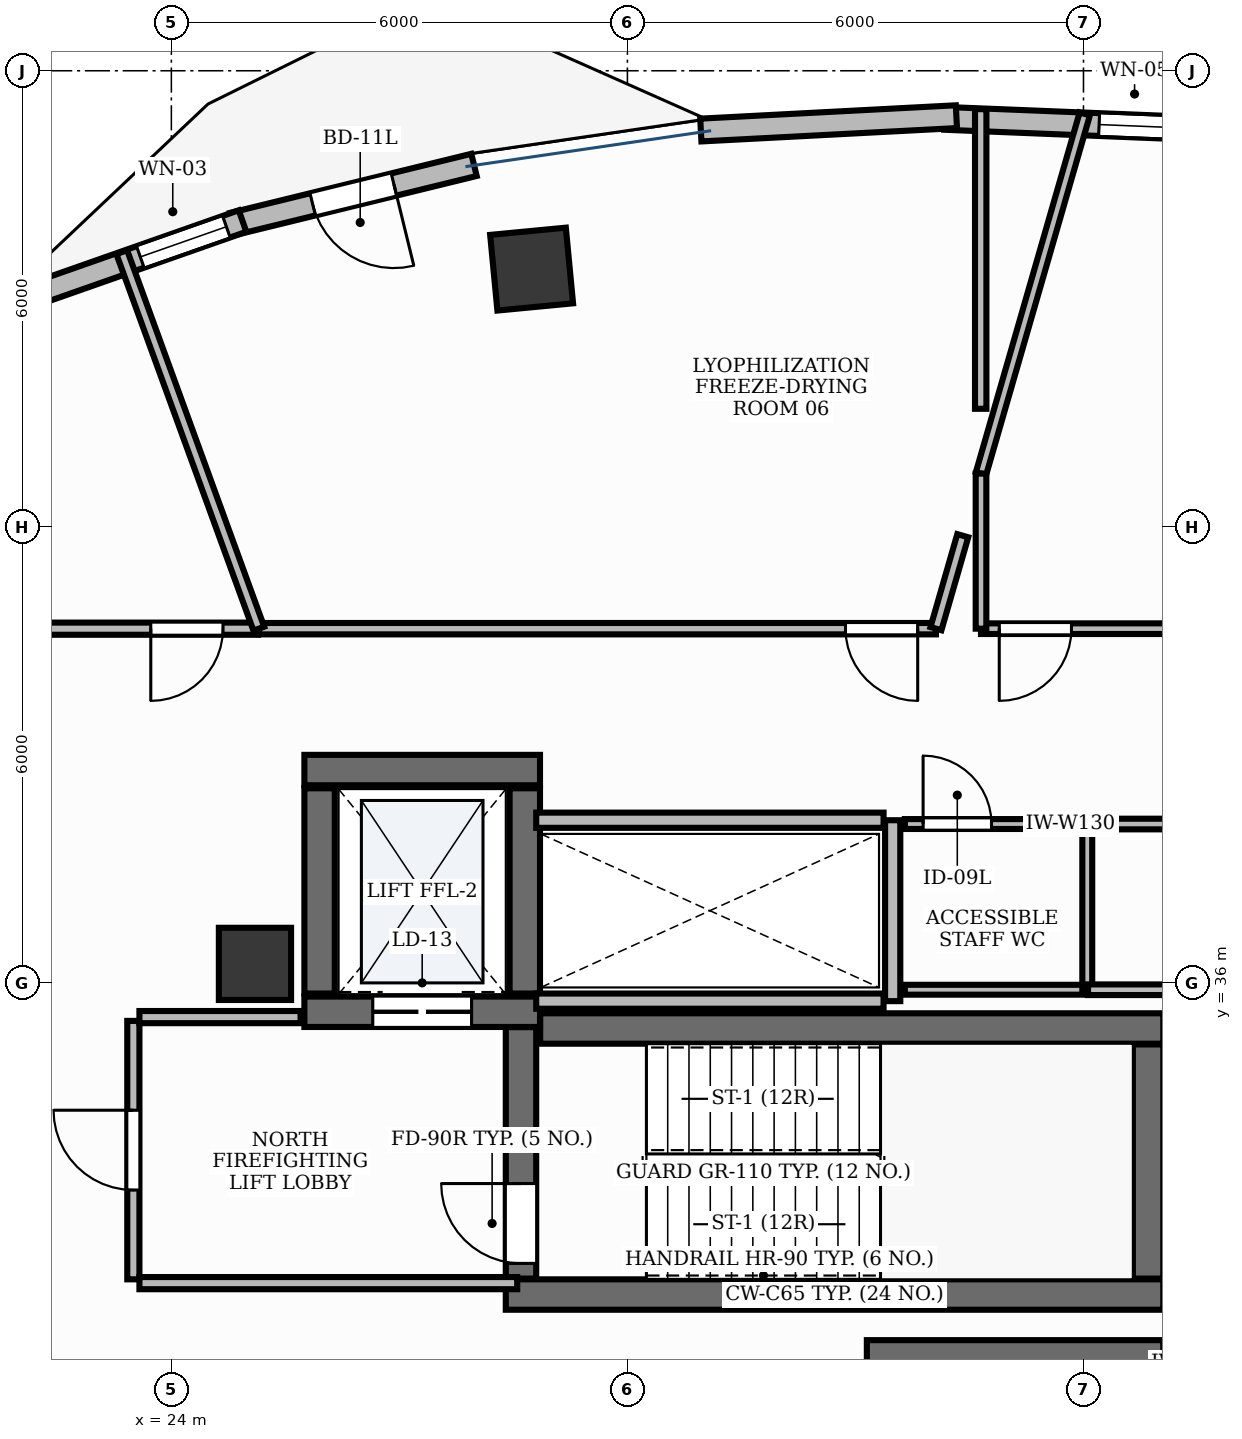
"""IFC4 building model, lengths in metres.
Left out: names, types, materials, properties, quantities, classifications, styles, units other than length and angle.
Written with IfcOpenShell. Run it as: python <this file> out.ifc"""

import sys

from ifc_helpers import new_model, si_unit, direction, frame, frame_2d, origin, origin_2d, place, context, subcontext, project, spatial, rectangle, extrude, element, fill, save


model = new_model("IFC4")
c1 = context("Model", 3, precision=1e-05, world=origin(), true_north=direction((0.0, 1.0)))
c2 = subcontext(c1, "Body", "Model", "MODEL_VIEW")
j1 = project(units=[si_unit("LENGTHUNIT", "METRE"), si_unit("PLANEANGLEUNIT", "RADIAN")], contexts=[c1])
p1 = place(None, origin())
s1 = spatial("IfcSite", under=j1, at=p1, CompositionType="ELEMENT")
p2 = place(p1, origin())
s2 = spatial("IfcBuilding", under=s1, at=p2, CompositionType="ELEMENT")
p3 = place(p2, frame((0.0, 0.0, 171.0)))
s3 = spatial("IfcBuildingStorey", under=s2, at=p3, CompositionType="ELEMENT", Elevation=171.0)
p4 = place(p3, frame((28.852, 35.4, 0.0), z_axis=(0.0, 0.0, 1.0), x_axis=(1.0, 0.0, 0.0)))
e1 = element("IfcWall", 1, at=p4, inside=s3, PredefinedType="SHEAR", context=c2, shape_type="SweptSolid", body=[
    extrude(rectangle(XDim=8.198, YDim=0.4, at=frame_2d((4.099, 0.0))), origin(), (0.0, 0.0, 1.0), 3.9),
])
p5 = place(p3, frame((28.4, 31.9, 0.0), z_axis=(0.0, 0.0, 1.0), x_axis=(1.0, 0.0, 0.0)))
e2 = element("IfcWall", 2, at=p5, inside=s3, PredefinedType="SHEAR", context=c2, shape_type="SweptSolid", body=[
    extrude(rectangle(XDim=8.65, YDim=0.4, at=frame_2d((4.325, 0.0))), origin(), (0.0, 0.0, 1.0), 3.9),
])
p6 = place(p3, frame((36.85, 32.11, 0.0), z_axis=(0.0, 0.0, 1.0), x_axis=(0.0, 1.0, 0.0)))
e3 = element("IfcWall", 3, at=p6, inside=s3, PredefinedType="SHEAR", context=c2, shape_type="SweptSolid", body=[
    extrude(rectangle(XDim=3.08, YDim=0.4, at=frame_2d((1.54, 0.0))), origin(), (0.0, 0.0, 1.0), 3.9),
])
p7 = place(p3, frame((28.6, 32.11, 0.0), z_axis=(0.0, 0.0, 1.0), x_axis=(0.0, 1.0, 0.0)))
e4 = element("IfcWall", 4, at=p7, inside=s3, PredefinedType="SHEAR", context=c2, shape_type="SweptSolid", body=[
    extrude(rectangle(XDim=3.308, YDim=0.4, at=frame_2d((1.654, 0.0))), origin(), (0.0, 0.0, 1.0), 3.9),
])
p8 = place(p7, frame((0.2, 0.0, 0.0)))
e5 = element("IfcOpeningElement", 5, at=p8, cuts=e4, PredefinedType="OPENING", context=c2, shape_type="SweptSolid", body=[
    extrude(rectangle(XDim=1.05, YDim=2.15, at=frame_2d((0.525, 1.075))), frame((0.0, 0.215, 0.0), z_axis=(0.0, -1.0, 0.0), x_axis=(1.0, 0.0, 0.0)), (0.0, 0.0, 1.0), 0.43),
])
p9 = place(p3, frame((33.15, 31.1, 0.0), z_axis=(0.0, 0.0, 1.0), x_axis=(1.0, 0.0, 0.0)))
e6 = element("IfcWall", 6, at=p9, inside=s3, PredefinedType="SHEAR", context=c2, shape_type="SweptSolid", body=[
    extrude(rectangle(XDim=3.9, YDim=0.4, at=frame_2d((1.95, 0.0))), origin(), (0.0, 0.0, 1.0), 3.9),
])
p10 = place(p3, frame((25.75, 38.8, 0.0), z_axis=(0.0, 0.0, 1.0), x_axis=(1.0, 0.0, 0.0)))
e7 = element("IfcWall", 7, at=p10, inside=s3, PredefinedType="SHEAR", context=c2, shape_type="SweptSolid", body=[
    extrude(rectangle(XDim=3.1, YDim=0.4, at=frame_2d((1.55, 0.0))), origin(), (0.0, 0.0, 1.0), 3.9),
])
p11 = place(p3, frame((25.75, 35.62, 0.0), z_axis=(0.0, 0.0, 1.0), x_axis=(1.0, 0.0, 0.0)))
e8 = element("IfcWall", 8, at=p11, inside=s3, PredefinedType="SHEAR", context=c2, shape_type="SweptSolid", body=[
    extrude(rectangle(XDim=3.1, YDim=0.4, at=frame_2d((1.55, 0.0))), origin(), (0.0, 0.0, 1.0), 3.9),
])
p12 = place(p11, frame((0.9, 0.0, 0.0)))
e9 = element("IfcOpeningElement", 9, at=p12, cuts=e8, PredefinedType="OPENING", context=c2, shape_type="SweptSolid", body=[
    extrude(rectangle(XDim=1.3, YDim=2.2, at=frame_2d((0.65, 1.1))), frame((0.0, 0.215, 0.0), z_axis=(0.0, -1.0, 0.0), x_axis=(1.0, 0.0, 0.0)), (0.0, 0.0, 1.0), 0.43),
])
for number, where, z_axis, x_axis in (
    (10, (25.95, 35.86, 0.0), (0.0, 0.0, 1.0), (0.0, 1.0, 0.0)),
    (11, (28.65, 35.86, 0.0), (0.0, 0.0, 1.0), (0.0, 1.0, 0.0)),
):
    element("IfcWall", number, at=place(p3, frame(where, z_axis=z_axis, x_axis=x_axis)), inside=s3, PredefinedType="SHEAR", context=c2, shape_type="SweptSolid", body=[
        extrude(rectangle(XDim=2.7, YDim=0.4, at=frame_2d((1.35, 0.0))), origin(), (0.0, 0.0, 1.0), 3.9),
    ])
p13 = place(p3, frame((25.1, 36.25, -0.0), z_axis=(0.0, 0.0, 1.0), x_axis=(1.0, 0.0, 0.0)))
e12 = element("IfcColumn", 12, at=p13, inside=s3, PredefinedType="PILASTER", context=c2, shape_type="SweptSolid", body=[
    extrude(rectangle(XDim=0.95, YDim=0.95, at=origin_2d()), origin(), (0.0, 0.0, 1.0), 3.901),
])
p14 = place(p3, frame((28.74, 45.39, -0.0), z_axis=(0.0, 0.0, 1.0), x_axis=(0.995462868748, 0.095150811579, 0.0)))
e13 = element("IfcColumn", 13, at=p14, inside=s3, PredefinedType="COLUMN", context=c2, shape_type="SweptSolid", body=[
    extrude(rectangle(XDim=1.0, YDim=1.0, at=origin_2d()), origin(), (0.0, 0.0, 1.0), 3.901),
])
p15 = place(p3, frame((37.5, 47.24, 0.0), z_axis=(0.0, 0.0, 1.0), x_axis=(-0.999191674443, 0.040199474165, 0.0)))
e14 = element("IfcWall", 14, at=p15, inside=s3, PredefinedType="STANDARD", context=c2, shape_type="SweptSolid", body=[
    extrude(rectangle(XDim=3.328, YDim=0.3, at=frame_2d((1.664, 0.0))), origin(), (0.0, 0.0, 1.0), 3.9),
])
p16 = place(p15, frame((0.395, 0.0, 0.95)))
e15 = element("IfcOpeningElement", 15, at=p16, cuts=e14, PredefinedType="OPENING", context=c2, shape_type="SweptSolid", body=[
    extrude(rectangle(XDim=0.9, YDim=1.8, at=frame_2d((0.45, 0.9))), frame((0.0, 0.165, 0.0), z_axis=(0.0, -1.0, 0.0), x_axis=(1.0, 0.0, 0.0)), (0.0, 0.0, 1.0), 0.33),
])
p17 = place(p3, frame((27.982, 46.762, 0.0), z_axis=(0.0, 0.0, 1.0), x_axis=(-0.971312804689, -0.237805457142, 0.0)))
e16 = element("IfcWall", 16, at=p17, inside=s3, PredefinedType="STANDARD", context=c2, shape_type="SweptSolid", body=[
    extrude(rectangle(XDim=3.269, YDim=0.3, at=frame_2d((1.634, 0.0))), origin(), (0.0, 0.0, 1.0), 3.9),
])
p18 = place(p17, frame((1.084, 0.0, 0.0)))
e17 = element("IfcOpeningElement", 17, at=p18, cuts=e16, PredefinedType="OPENING", context=c2, shape_type="SweptSolid", body=[
    extrude(rectangle(XDim=1.1, YDim=2.15, at=frame_2d((0.55, 1.075))), frame((0.0, 0.165, 0.0), z_axis=(0.0, -1.0, 0.0), x_axis=(1.0, 0.0, 0.0)), (0.0, 0.0, 1.0), 0.33),
])
p19 = place(p3, frame((24.937, 46.023, 0.0), z_axis=(0.0, 0.0, 1.0), x_axis=(-0.943495444321, -0.331385495377, 0.0)))
e18 = element("IfcWall", 18, at=p19, inside=s3, PredefinedType="STANDARD", context=c2, shape_type="SweptSolid", body=[
    extrude(rectangle(XDim=3.214, YDim=0.3, at=frame_2d((1.607, 0.0))), origin(), (0.0, 0.0, 1.0), 3.9),
])
p20 = place(p19, frame((0.226, 0.0, 0.9)))
e19 = element("IfcOpeningElement", 19, at=p20, cuts=e18, PredefinedType="OPENING", context=c2, shape_type="SweptSolid", body=[
    extrude(rectangle(XDim=1.2, YDim=2.7, at=frame_2d((0.6, 1.35))), frame((0.0, 0.165, 0.0), z_axis=(0.0, -1.0, 0.0), x_axis=(1.0, 0.0, 0.0)), (0.0, 0.0, 1.0), 0.33),
])
p21 = place(p3, frame((34.328, 47.396, 0.0), z_axis=(0.0, 0.0, 1.0), x_axis=(-0.998639777298, -0.052140149581, 0.0)))
e20 = element("IfcWall", 20, at=p21, inside=s3, PredefinedType="STANDARD", context=c2, shape_type="SweptSolid", body=[
    extrude(rectangle(XDim=3.367, YDim=0.3, at=frame_2d((1.683, 0.0))), origin(), (0.0, 0.0, 1.0), 3.9),
])
p22 = place(p3, frame((33.49, 35.76, 0.0), z_axis=(0.0, 0.0, 1.0), x_axis=(0.0, 1.0, 0.0)))
e21 = element("IfcWall", 21, at=p22, inside=s3, PredefinedType="PARTITIONING", context=c2, shape_type="SweptSolid", body=[
    extrude(rectangle(XDim=2.38, YDim=0.2, at=frame_2d((1.19, 0.0))), origin(), (0.0, 0.0, 1.0), 2.91),
])
for number, where, z_axis, x_axis in (
    (22, (28.8, 35.76, 0.0), (0.0, 0.0, 1.0), (1.0, 0.0, 0.0)),
    (23, (28.8, 38.14, 0.0), (0.0, 0.0, 1.0), (1.0, 0.0, 0.0)),
):
    element("IfcWall", number, at=place(p3, frame(where, z_axis=z_axis, x_axis=x_axis)), inside=s3, PredefinedType="PARTITIONING", context=c2, shape_type="SweptSolid", body=[
        extrude(rectangle(XDim=4.57, YDim=0.2, at=frame_2d((2.285, 0.0))), origin(), (0.0, 0.0, 1.0), 2.91),
    ])
p23 = place(p3, frame((23.5, 32.1, 0.0), z_axis=(0.0, 0.0, 1.0), x_axis=(0.0, 1.0, 0.0)))
e24 = element("IfcWall", 24, at=p23, inside=s3, PredefinedType="PARTITIONING", context=c2, shape_type="SweptSolid", body=[
    extrude(rectangle(XDim=3.4, YDim=0.16, at=frame_2d((1.7, 0.0))), origin(), (0.0, 0.0, 1.0), 2.91),
])
p24 = place(p23, frame((1.175, 0.0, 0.0)))
e25 = element("IfcOpeningElement", 25, at=p24, cuts=e24, PredefinedType="OPENING", context=c2, shape_type="SweptSolid", body=[
    extrude(rectangle(XDim=1.05, YDim=2.15, at=frame_2d((0.525, 1.075))), frame((0.0, 0.095, 0.0), z_axis=(0.0, -1.0, 0.0), x_axis=(1.0, 0.0, 0.0)), (0.0, 0.0, 1.0), 0.19),
])
p25 = place(p3, frame((23.58, 32.05, 0.0), z_axis=(0.0, 0.0, 1.0), x_axis=(1.0, 0.0, 0.0)))
e26 = element("IfcWall", 26, at=p25, inside=s3, PredefinedType="PARTITIONING", context=c2, shape_type="SweptSolid", body=[
    extrude(rectangle(XDim=4.97, YDim=0.16, at=frame_2d((2.485, 0.0))), origin(), (0.0, 0.0, 1.0), 2.91),
])
p26 = place(p3, frame((23.58, 35.55, 0.0), z_axis=(0.0, 0.0, 1.0), x_axis=(1.0, 0.0, 0.0)))
e27 = element("IfcWall", 27, at=p26, inside=s3, PredefinedType="PARTITIONING", context=c2, shape_type="SweptSolid", body=[
    extrude(rectangle(XDim=2.12, YDim=0.16, at=frame_2d((1.06, 0.0))), origin(), (0.0, 0.0, 1.0), 2.91),
])
p27 = place(p3, frame((33.65, 38.09, 0.0), z_axis=(0.0, 0.0, 1.0), x_axis=(1.0, 0.0, 0.0)))
e28 = element("IfcWall", 28, at=p27, inside=s3, PredefinedType="PARTITIONING", context=c2, shape_type="SweptSolid", body=[
    extrude(rectangle(XDim=2.4, YDim=0.13, at=frame_2d((1.2, 0.0))), origin(), (0.0, 0.0, 1.0), 2.91),
])
p28 = place(p27, frame((0.24, 0.0, 0.0)))
e29 = element("IfcOpeningElement", 29, at=p28, cuts=e28, PredefinedType="OPENING", context=c2, shape_type="SweptSolid", body=[
    extrude(rectangle(XDim=0.9, YDim=2.15, at=frame_2d((0.45, 1.075))), frame((0.0, 0.08, 0.0), z_axis=(0.0, -1.0, 0.0), x_axis=(1.0, 0.0, 0.0)), (0.0, 0.0, 1.0), 0.16),
])
p29 = place(p3, frame((37.2, 40.66, 0.0), z_axis=(0.0, 0.0, 1.0), x_axis=(-1.0, 0.0, 0.0)))
e30 = element("IfcWall", 30, at=p29, inside=s3, PredefinedType="PARTITIONING", context=c2, shape_type="SweptSolid", body=[
    extrude(rectangle(XDim=2.548, YDim=0.14, at=frame_2d((1.274, 0.0))), origin(), (0.0, 0.0, 1.0), 2.91),
])
p30 = place(p29, frame((1.358, 0.0, 0.0)))
e31 = element("IfcOpeningElement", 31, at=p30, cuts=e30, PredefinedType="OPENING", context=c2, shape_type="SweptSolid", body=[
    extrude(rectangle(XDim=0.95, YDim=2.15, at=frame_2d((0.475, 1.075))), frame((0.0, 0.085, 0.0), z_axis=(0.0, -1.0, 0.0), x_axis=(1.0, 0.0, 0.0)), (0.0, 0.0, 1.0), 0.17),
])
p31 = place(p3, frame((34.059, 40.66, 0.0), z_axis=(0.0, 0.0, 1.0), x_axis=(-1.0, 0.0, 0.0)))
e32 = element("IfcWall", 32, at=p31, inside=s3, PredefinedType="PARTITIONING", context=c2, shape_type="SweptSolid", body=[
    extrude(rectangle(XDim=8.908, YDim=0.15, at=frame_2d((4.454, 0.0))), origin(), (0.0, 0.0, 1.0), 2.91),
])
p32 = place(p31, frame((0.24, 0.0, 0.0)))
e33 = element("IfcOpeningElement", 33, at=p32, cuts=e32, PredefinedType="OPENING", context=c2, shape_type="SweptSolid", body=[
    extrude(rectangle(XDim=0.95, YDim=2.15, at=frame_2d((0.475, 1.075))), frame((0.0, 0.09, 0.0), z_axis=(0.0, -1.0, 0.0), x_axis=(1.0, 0.0, 0.0)), (0.0, 0.0, 1.0), 0.18),
])
p33 = place(p3, frame((25.14, 40.66, 0.0), z_axis=(0.0, 0.0, 1.0), x_axis=(-1.0, 0.0, 0.0)))
e34 = element("IfcWall", 34, at=p33, inside=s3, PredefinedType="PARTITIONING", context=c2, shape_type="SweptSolid", body=[
    extrude(rectangle(XDim=3.39, YDim=0.16, at=frame_2d((1.695, 0.0))), origin(), (0.0, 0.0, 1.0), 2.91),
])
p34 = place(p33, frame((0.461, 0.0, 0.0)))
e35 = element("IfcOpeningElement", 35, at=p34, cuts=e34, PredefinedType="OPENING", context=c2, shape_type="SweptSolid", body=[
    extrude(rectangle(XDim=0.95, YDim=2.15, at=frame_2d((0.475, 1.075))), frame((0.0, 0.095, 0.0), z_axis=(0.0, -1.0, 0.0), x_axis=(1.0, 0.0, 0.0)), (0.0, 0.0, 1.0), 0.19),
])
p35 = place(p3, frame((36.05, 35.91, 0.0), z_axis=(0.0, 0.0, 1.0), x_axis=(-1.0, 0.0, 0.0)))
e36 = element("IfcWall", 36, at=p35, inside=s3, PredefinedType="PARTITIONING", context=c2, shape_type="SweptSolid", body=[
    extrude(rectangle(XDim=2.4, YDim=0.13, at=frame_2d((1.2, 0.0))), origin(), (0.0, 0.0, 1.0), 2.91),
])
p36 = place(p3, frame((36.05, 38.09, 0.0), z_axis=(0.0, 0.0, 1.0), x_axis=(0.0, -1.0, 0.0)))
e37 = element("IfcWall", 37, at=p36, inside=s3, PredefinedType="PARTITIONING", context=c2, shape_type="SweptSolid", body=[
    extrude(rectangle(XDim=2.18, YDim=0.13, at=frame_2d((1.09, 0.0))), origin(), (0.0, 0.0, 1.0), 2.91),
])
p37 = place(p3, frame((34.652, 42.701, 0.0), z_axis=(0.0, 0.0, 1.0), x_axis=(0.277202021351, 0.960811656548, 0.0)))
e38 = element("IfcWall", 38, at=p37, inside=s3, PredefinedType="PARTITIONING", context=c2, shape_type="SweptSolid", body=[
    extrude(rectangle(XDim=4.924, YDim=0.14, at=frame_2d((2.462, 0.0))), origin(), (0.0, 0.0, 1.0), 2.91),
])
p38 = place(p3, frame((37.35, 35.91, 0.0), z_axis=(0.0, 0.0, 1.0), x_axis=(-1.0, 0.0, 0.0)))
e39 = element("IfcWall", 39, at=p38, inside=s3, PredefinedType="PARTITIONING", context=c2, shape_type="SweptSolid", body=[
    extrude(rectangle(XDim=1.29, YDim=0.14, at=frame_2d((0.645, 0.0))), origin(), (0.0, 0.0, 1.0), 2.91),
])
p39 = place(p3, frame((36.06, 38.09, 0.0), z_axis=(0.0, 0.0, 1.0), x_axis=(1.0, 0.0, 0.0)))
e40 = element("IfcWall", 40, at=p39, inside=s3, PredefinedType="PARTITIONING", context=c2, shape_type="SweptSolid", body=[
    extrude(rectangle(XDim=1.14, YDim=0.14, at=frame_2d((0.57, 0.0))), origin(), (0.0, 0.0, 1.0), 2.91),
])
p40 = place(p3, frame((34.652, 40.66, 0.0), z_axis=(0.0, 0.0, 1.0), x_axis=(0.0, 1.0, 0.0)))
e41 = element("IfcWall", 41, at=p40, inside=s3, PredefinedType="PARTITIONING", context=c2, shape_type="SweptSolid", body=[
    extrude(rectangle(XDim=2.041, YDim=0.14, at=frame_2d((1.021, 0.0))), origin(), (0.0, 0.0, 1.0), 2.91),
])
p41 = place(p3, frame((34.648, 47.495, 0.0), z_axis=(0.0, 0.0, 1.0), x_axis=(0.0, -1.0, 0.0)))
e42 = element("IfcWall", 42, at=p41, inside=s3, PredefinedType="PARTITIONING", context=c2, shape_type="SweptSolid", body=[
    extrude(rectangle(XDim=3.942, YDim=0.15, at=frame_2d((1.971, 0.0))), origin(), (0.0, 0.0, 1.0), 2.91),
])
p42 = place(p3, frame((34.412, 41.883, 0.0), z_axis=(0.0, 0.0, 1.0), x_axis=(-0.277252558392, -0.960797074759, 0.0)))
e43 = element("IfcWall", 43, at=p42, inside=s3, PredefinedType="PARTITIONING", context=c2, shape_type="SweptSolid", body=[
    extrude(rectangle(XDim=1.273, YDim=0.15, at=frame_2d((0.637, 0.0))), origin(), (0.0, 0.0, 1.0), 2.91),
])
p43 = place(p3, frame((25.151, 40.66, 0.0), z_axis=(0.0, 0.0, 1.0), x_axis=(-0.341995928267, 0.939701433993, 0.0)))
e44 = element("IfcWall", 44, at=p43, inside=s3, PredefinedType="PARTITIONING", context=c2, shape_type="SweptSolid", body=[
    extrude(rectangle(XDim=5.271, YDim=0.15, at=frame_2d((2.636, 0.0))), origin(), (0.0, 0.0, 1.0), 2.91),
])
p44 = place(p16, origin())
e45 = element("IfcWindow", 45, at=p44, inside=s3, PartitioningType="SINGLE_PANEL", PredefinedType="WINDOW", context=c2, shape_type="SweptSolid", body=[
    extrude(rectangle(XDim=0.9, YDim=1.8, at=frame_2d((0.45, 0.9))), frame((0.0, 0.03, 0.0), z_axis=(0.0, -1.0, 0.0), x_axis=(1.0, 0.0, 0.0)), (0.0, 0.0, 1.0), 0.06),
])
fill(e15, e45)
p45 = place(p18, origin())
e46 = element("IfcDoor", 46, at=p45, inside=s3, OperationType="SINGLE_SWING_LEFT", PredefinedType="DOOR", context=c2, shape_type="SweptSolid", body=[
    extrude(rectangle(XDim=1.1, YDim=2.15, at=frame_2d((0.55, 1.075))), frame((0.0, 0.025, 0.0), z_axis=(0.0, -1.0, 0.0), x_axis=(1.0, 0.0, 0.0)), (0.0, 0.0, 1.0), 0.05),
])
fill(e17, e46)
p46 = place(p20, origin())
e47 = element("IfcWindow", 47, at=p46, inside=s3, PartitioningType="SINGLE_PANEL", PredefinedType="WINDOW", context=c2, shape_type="SweptSolid", body=[
    extrude(rectangle(XDim=1.2, YDim=2.7, at=frame_2d((0.6, 1.35))), frame((0.0, 0.03, 0.0), z_axis=(0.0, -1.0, 0.0), x_axis=(1.0, 0.0, 0.0)), (0.0, 0.0, 1.0), 0.06),
])
fill(e19, e47)
p47 = place(p8, origin())
e48 = element("IfcDoor", 48, at=p47, inside=s3, OperationType="SINGLE_SWING_RIGHT", PredefinedType="DOOR", context=c2, shape_type="SweptSolid", body=[
    extrude(rectangle(XDim=1.05, YDim=2.15, at=frame_2d((0.525, 1.075))), frame((0.0, 0.025, 0.0), z_axis=(0.0, -1.0, 0.0), x_axis=(1.0, 0.0, 0.0)), (0.0, 0.0, 1.0), 0.05),
])
fill(e5, e48)
p48 = place(p12, origin())
e49 = element("IfcDoor", 49, at=p48, inside=s3, OperationType="DOUBLE_DOOR_SLIDING", PredefinedType="DOOR", context=c2, shape_type="SweptSolid", body=[
    extrude(rectangle(XDim=1.3, YDim=2.2, at=frame_2d((0.65, 1.1))), frame((0.0, 0.025, 0.0), z_axis=(0.0, -1.0, 0.0), x_axis=(1.0, 0.0, 0.0)), (0.0, 0.0, 1.0), 0.05),
])
fill(e9, e49)
p49 = place(p24, origin())
e50 = element("IfcDoor", 50, at=p49, inside=s3, OperationType="SINGLE_SWING_RIGHT", PredefinedType="DOOR", context=c2, shape_type="SweptSolid", body=[
    extrude(rectangle(XDim=1.05, YDim=2.15, at=frame_2d((0.525, 1.075))), frame((0.0, 0.025, 0.0), z_axis=(0.0, -1.0, 0.0), x_axis=(1.0, 0.0, 0.0)), (0.0, 0.0, 1.0), 0.05),
])
fill(e25, e50)
p50 = place(p28, origin())
e51 = element("IfcDoor", 51, at=p50, inside=s3, OperationType="SINGLE_SWING_LEFT", PredefinedType="DOOR", context=c2, shape_type="SweptSolid", body=[
    extrude(rectangle(XDim=0.9, YDim=2.15, at=frame_2d((0.45, 1.075))), frame((0.0, 0.025, 0.0), z_axis=(0.0, -1.0, 0.0), x_axis=(1.0, 0.0, 0.0)), (0.0, 0.0, 1.0), 0.05),
])
fill(e29, e51)
p51 = place(p30, origin())
e52 = element("IfcDoor", 52, at=p51, inside=s3, OperationType="SINGLE_SWING_RIGHT", PredefinedType="DOOR", context=c2, shape_type="SweptSolid", body=[
    extrude(rectangle(XDim=0.95, YDim=2.15, at=frame_2d((0.475, 1.075))), frame((0.0, 0.025, 0.0), z_axis=(0.0, -1.0, 0.0), x_axis=(1.0, 0.0, 0.0)), (0.0, 0.0, 1.0), 0.05),
])
fill(e31, e52)
p52 = place(p32, origin())
e53 = element("IfcDoor", 53, at=p52, inside=s3, OperationType="SINGLE_SWING_LEFT", PredefinedType="DOOR", context=c2, shape_type="SweptSolid", body=[
    extrude(rectangle(XDim=0.95, YDim=2.15, at=frame_2d((0.475, 1.075))), frame((0.0, 0.025, 0.0), z_axis=(0.0, -1.0, 0.0), x_axis=(1.0, 0.0, 0.0)), (0.0, 0.0, 1.0), 0.05),
])
fill(e33, e53)
p53 = place(p34, origin())
e54 = element("IfcDoor", 54, at=p53, inside=s3, OperationType="SINGLE_SWING_RIGHT", PredefinedType="DOOR", context=c2, shape_type="SweptSolid", body=[
    extrude(rectangle(XDim=0.95, YDim=2.15, at=frame_2d((0.475, 1.075))), frame((0.0, 0.025, 0.0), z_axis=(0.0, -1.0, 0.0), x_axis=(1.0, 0.0, 0.0)), (0.0, 0.0, 1.0), 0.05),
])
fill(e35, e54)
save(model, sys.argv[1])
